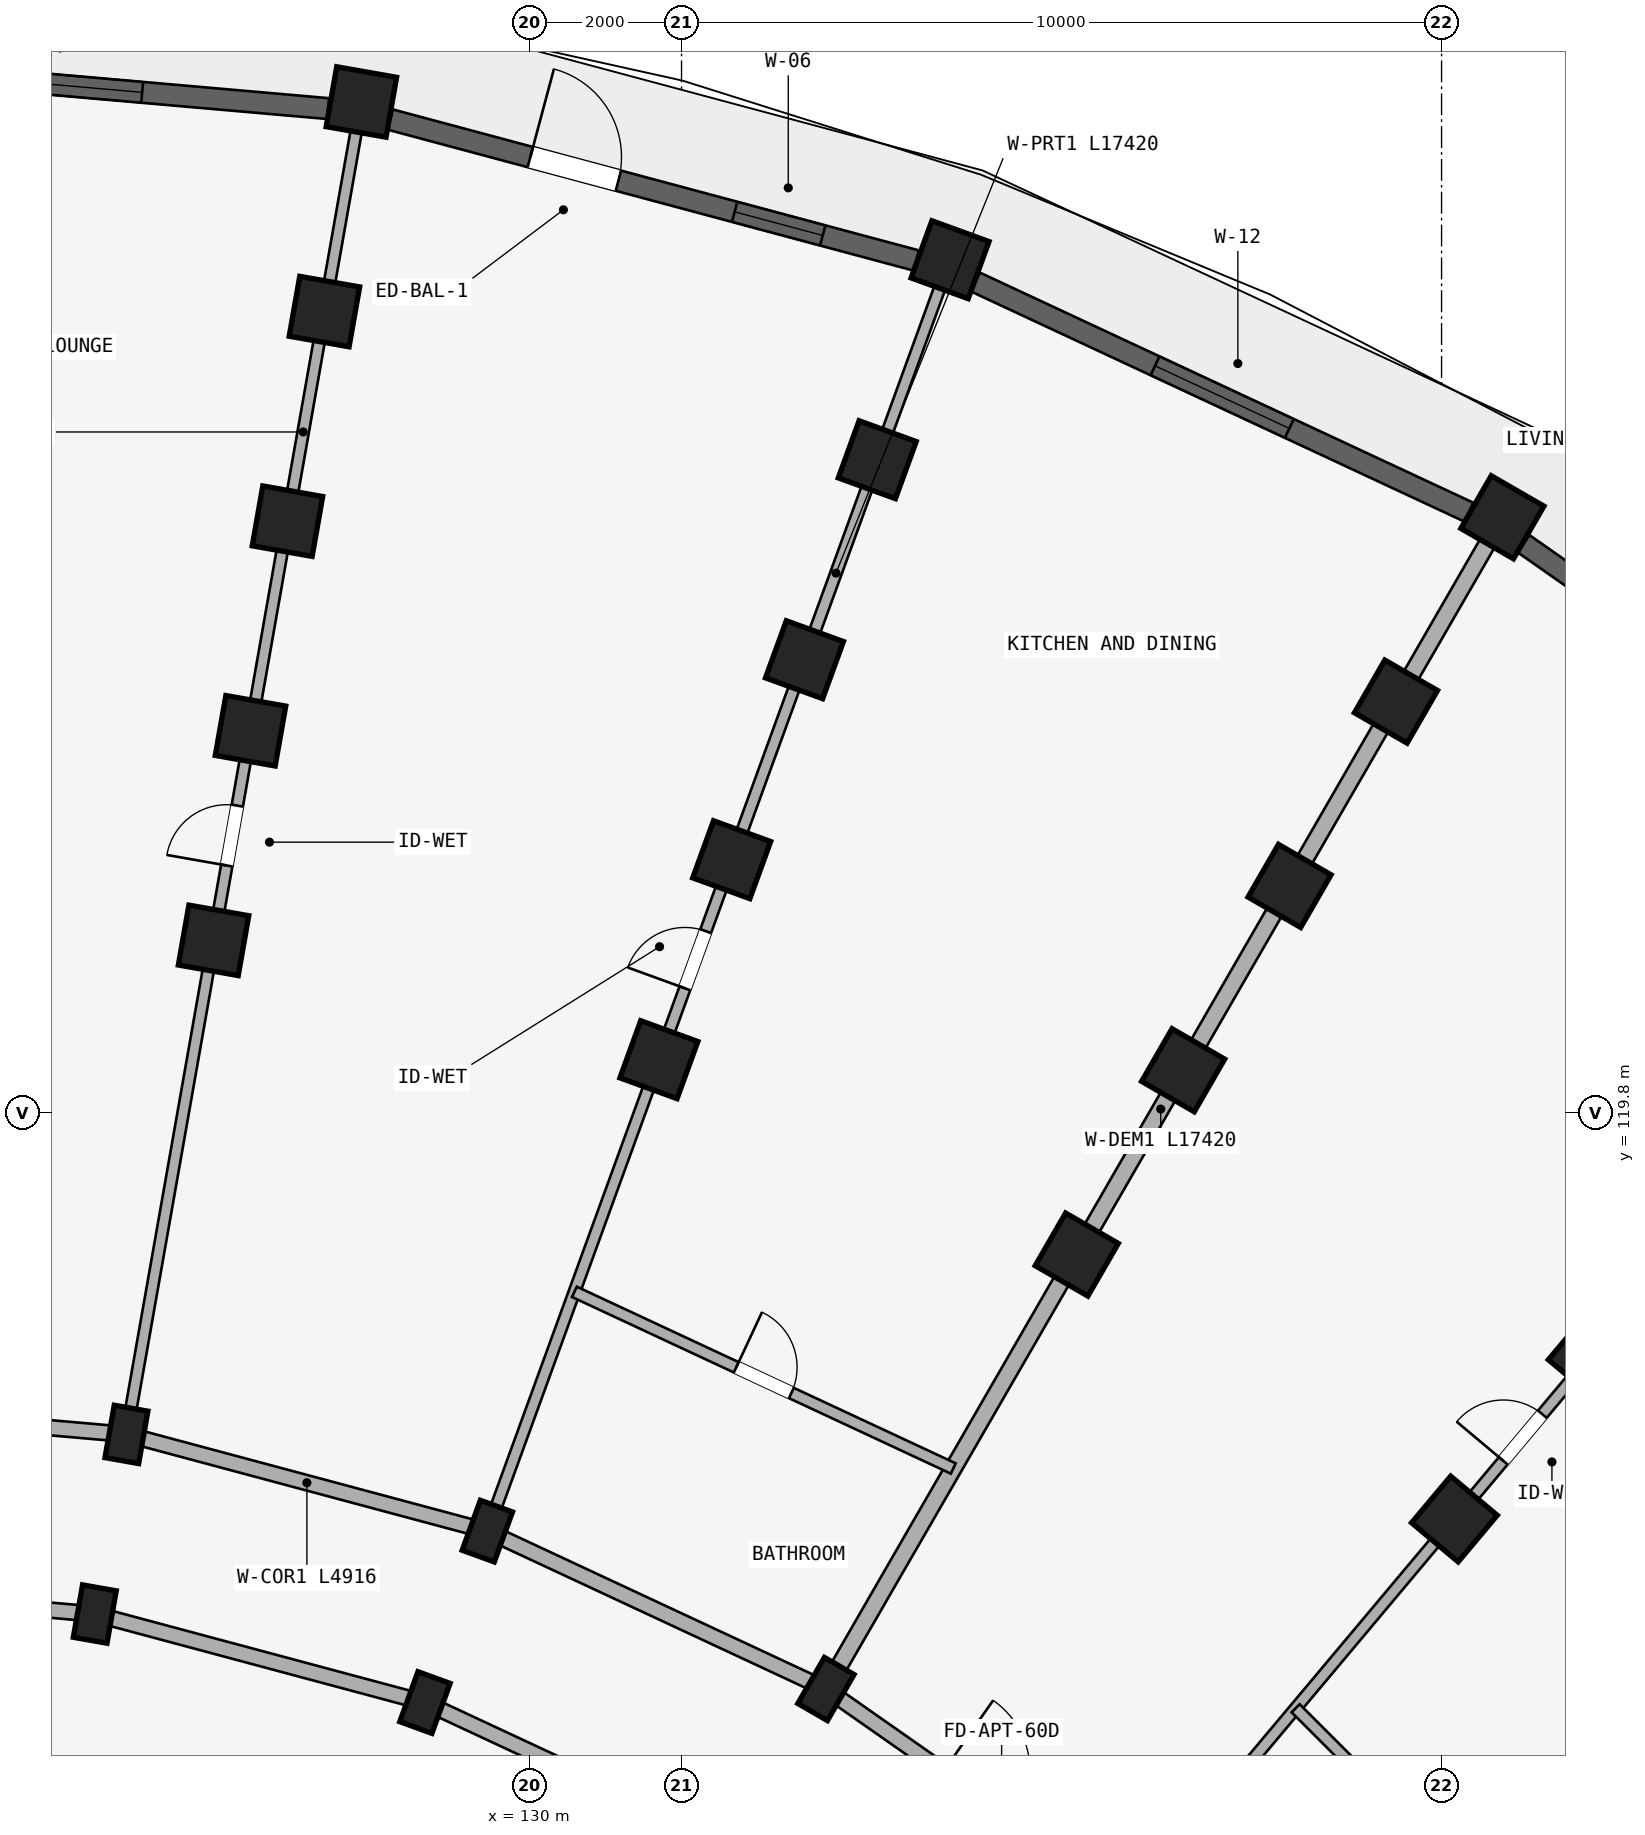
"""IFC4 building model, lengths in metres.
Left out: names, types, materials, properties, quantities, classifications, styles, units other than length and angle.
Written with IfcOpenShell. Run it as: python <this file> out.ifc"""

import sys

from ifc_helpers import new_model, si_unit, direction, frame, frame_2d, origin, origin_2d, place, context, subcontext, project, spatial, rectangle, extrude, element, fill, save


model = new_model("IFC4")
c1 = context("Model", 3, precision=1e-05, world=origin(), true_north=direction((0.0, 1.0)))
c2 = subcontext(c1, "Body", "Model", "MODEL_VIEW")
j1 = project(units=[si_unit("LENGTHUNIT", "METRE"), si_unit("PLANEANGLEUNIT", "RADIAN")], contexts=[c1])
p1 = place(None, origin())
s1 = spatial("IfcSite", under=j1, at=p1, CompositionType="ELEMENT")
p2 = place(p1, origin())
s2 = spatial("IfcBuilding", under=s1, at=p2, CompositionType="ELEMENT")
p3 = place(p2, frame((0.0, 0.0, 15.0)))
s3 = spatial("IfcBuildingStorey", under=s2, at=p3, CompositionType="ELEMENT", Elevation=15.0)
for number, where, z_axis, x_axis in (
    (1, (124.28, 113.208, 0.0), (0.0, 0.0, 1.0), (-0.985, 0.174, 0.0)),
    (2, (124.697, 115.572, 0.0), (0.0, 0.0, 1.0), (-0.985, 0.174, 0.0)),
):
    element("IfcColumn", number, at=place(p3, frame(where, z_axis=z_axis, x_axis=x_axis)), inside=s3, PredefinedType="COLUMN", context=c2, shape_type="SweptSolid", body=[
        extrude(rectangle(XDim=0.45, YDim=0.7, at=origin_2d()), origin(), (0.0, 0.0, 1.0), 2.93),
    ])
for number, where, z_axis, x_axis in (
    (3, (125.843, 122.071, 0.0), (0.0, 0.0, 1.0), (-0.985, 0.174, 0.0)),
    (4, (126.329, 124.829, 0.0), (0.0, 0.0, 1.0), (-0.985, 0.174, 0.0)),
    (5, (126.815, 127.586, 0.0), (0.0, 0.0, 1.0), (-0.985, 0.174, 0.0)),
    (6, (127.302, 130.344, 0.0), (0.0, 0.0, 1.0), (-0.985, 0.174, 0.0)),
    (7, (127.788, 133.101, 0.0), (0.0, 0.0, 1.0), (-0.985, 0.174, 0.0)),
):
    element("IfcColumn", number, at=place(p3, frame(where, z_axis=z_axis, x_axis=x_axis)), inside=s3, PredefinedType="COLUMN", context=c2, shape_type="SweptSolid", body=[
        extrude(rectangle(XDim=0.8, YDim=0.8, at=origin_2d()), origin(), (0.0, 0.0, 1.0), 2.93),
    ])
for number, where, z_axis, x_axis in (
    (8, (128.624, 112.044, 0.0), (0.0, 0.0, 1.0), (-0.94, 0.342, 0.0)),
    (9, (129.445, 114.299, 0.0), (0.0, 0.0, 1.0), (-0.94, 0.342, 0.0)),
):
    element("IfcColumn", number, at=place(p3, frame(where, z_axis=z_axis, x_axis=x_axis)), inside=s3, PredefinedType="COLUMN", context=c2, shape_type="SweptSolid", body=[
        extrude(rectangle(XDim=0.45, YDim=0.7, at=origin_2d()), origin(), (0.0, 0.0, 1.0), 2.93),
    ])
for number, where, z_axis, x_axis in (
    (10, (131.702, 120.501, 0.0), (0.0, 0.0, 1.0), (-0.94, 0.342, 0.0)),
    (11, (132.66, 123.132, 0.0), (0.0, 0.0, 1.0), (-0.94, 0.342, 0.0)),
    (12, (133.618, 125.764, 0.0), (0.0, 0.0, 1.0), (-0.94, 0.342, 0.0)),
    (13, (134.575, 128.395, 0.0), (0.0, 0.0, 1.0), (-0.94, 0.342, 0.0)),
    (14, (135.533, 131.026, 0.0), (0.0, 0.0, 1.0), (-0.94, 0.342, 0.0)),
):
    element("IfcColumn", number, at=place(p3, frame(where, z_axis=z_axis, x_axis=x_axis)), inside=s3, PredefinedType="COLUMN", context=c2, shape_type="SweptSolid", body=[
        extrude(rectangle(XDim=0.8, YDim=0.8, at=origin_2d()), origin(), (0.0, 0.0, 1.0), 2.93),
    ])
p4 = place(p3, frame((133.9, 112.222, 0.0), z_axis=(0.0, 0.0, 1.0), x_axis=(-0.866025403784, 0.5, 0.0)))
e15 = element("IfcColumn", 15, at=p4, inside=s3, PredefinedType="COLUMN", context=c2, shape_type="SweptSolid", body=[
    extrude(rectangle(XDim=0.45, YDim=0.7, at=origin_2d()), origin(), (0.0, 0.0, 1.0), 2.93),
])
for number, where, z_axis, x_axis in (
    (16, (137.2, 117.938, 0.0), (0.0, 0.0, 1.0), (-0.866, 0.5, 0.0)),
    (17, (138.6, 120.363, 0.0), (0.0, 0.0, 1.0), (-0.866, 0.5, 0.0)),
    (18, (140.0, 122.787, 0.0), (0.0, 0.0, 1.0), (-0.866, 0.5, 0.0)),
    (19, (141.4, 125.212, 0.0), (0.0, 0.0, 1.0), (-0.866, 0.5, 0.0)),
    (20, (142.8, 127.637, 0.0), (0.0, 0.0, 1.0), (-0.866, 0.5, 0.0)),
    (21, (142.169, 114.458, 0.0), (0.0, 0.0, 1.0), (-0.766, 0.643, 0.0)),
    (22, (143.969, 116.603, 0.0), (0.0, 0.0, 1.0), (-0.766, 0.643, 0.0)),
):
    element("IfcColumn", number, at=place(p3, frame(where, z_axis=z_axis, x_axis=x_axis)), inside=s3, PredefinedType="COLUMN", context=c2, shape_type="SweptSolid", body=[
        extrude(rectangle(XDim=0.8, YDim=0.8, at=origin_2d()), origin(), (0.0, 0.0, 1.0), 2.93),
    ])
p5 = place(p3, frame((119.8, 113.6, 0.0), z_axis=(0.0, 0.0, 1.0), x_axis=(0.996191949488, -0.087187153726, 0.0)))
e23 = element("IfcWall", 23, at=p5, inside=s3, PredefinedType="STANDARD", context=c2, shape_type="SweptSolid", body=[
    extrude(rectangle(XDim=4.497, YDim=0.2, at=frame_2d((2.249, 0.0))), origin(), (0.0, 0.0, 1.0), 2.372),
])
p6 = place(p5, frame((1.729, 0.0, 0.0)))
e24 = element("IfcOpeningElement", 24, at=p6, cuts=e23, PredefinedType="OPENING", context=c2, shape_type="SweptSolid", body=[
    extrude(rectangle(XDim=1.04, YDim=2.15, at=frame_2d((0.52, 1.075))), frame((0.0, 0.11, 0.0), z_axis=(0.0, -1.0, 0.0), x_axis=(1.0, 0.0, 0.0)), (0.0, 0.0, 1.0), 0.22),
])
p7 = place(p3, frame((119.8, 116.0, 0.0), z_axis=(0.0, 0.0, 1.0), x_axis=(0.996193663584, -0.087167566415, 0.0)))
e25 = element("IfcWall", 25, at=p7, inside=s3, PredefinedType="STANDARD", context=c2, shape_type="SweptSolid", body=[
    extrude(rectangle(XDim=4.916, YDim=0.2, at=frame_2d((2.458, 0.0))), origin(), (0.0, 0.0, 1.0), 2.372),
])
p8 = place(p7, frame((1.918, 0.0, 0.0)))
e26 = element("IfcOpeningElement", 26, at=p8, cuts=e25, PredefinedType="OPENING", context=c2, shape_type="SweptSolid", body=[
    extrude(rectangle(XDim=1.08, YDim=2.15, at=frame_2d((0.54, 1.075))), frame((0.0, 0.11, 0.0), z_axis=(0.0, -1.0, 0.0), x_axis=(1.0, 0.0, 0.0)), (0.0, 0.0, 1.0), 0.22),
])
p9 = place(p3, frame((124.28, 113.208, 0.0), z_axis=(0.0, 0.0, 1.0), x_axis=(0.965934240054, -0.258787642463, 0.0)))
e27 = element("IfcWall", 27, at=p9, inside=s3, PredefinedType="STANDARD", context=c2, shape_type="SweptSolid", body=[
    extrude(rectangle(XDim=4.497, YDim=0.2, at=frame_2d((2.249, 0.0))), origin(), (0.0, 0.0, 1.0), 2.372),
])
p10 = place(p3, frame((124.697, 115.572, 0.0), z_axis=(0.0, 0.0, 1.0), x_axis=(0.965930095386, -0.258803112091, 0.0)))
e28 = element("IfcWall", 28, at=p10, inside=s3, PredefinedType="STANDARD", context=c2, shape_type="SweptSolid", body=[
    extrude(rectangle(XDim=4.916, YDim=0.2, at=frame_2d((2.458, 0.0))), origin(), (0.0, 0.0, 1.0), 2.372),
])
p11 = place(p3, frame((128.624, 112.044, 0.0), z_axis=(0.0, 0.0, 1.0), x_axis=(0.906307919131, -0.422617978463, 0.0)))
e29 = element("IfcWall", 29, at=p11, inside=s3, PredefinedType="STANDARD", context=c2, shape_type="SweptSolid", body=[
    extrude(rectangle(XDim=4.497, YDim=0.2, at=frame_2d((2.249, 0.0))), origin(), (0.0, 0.0, 1.0), 2.372),
])
p12 = place(p3, frame((129.445, 114.299, 0.0), z_axis=(0.0, 0.0, 1.0), x_axis=(0.906302381024, -0.422629854778, 0.0)))
e30 = element("IfcWall", 30, at=p12, inside=s3, PredefinedType="STANDARD", context=c2, shape_type="SweptSolid", body=[
    extrude(rectangle(XDim=4.915, YDim=0.2, at=frame_2d((2.458, 0.0))), origin(), (0.0, 0.0, 1.0), 2.372),
])
p13 = place(p3, frame((133.9, 112.222, 0.0), z_axis=(0.0, 0.0, 1.0), x_axis=(0.819140911474, -0.573592335331, 0.0)))
e31 = element("IfcWall", 31, at=p13, inside=s3, PredefinedType="STANDARD", context=c2, shape_type="SweptSolid", body=[
    extrude(rectangle(XDim=4.916, YDim=0.2, at=frame_2d((2.458, 0.0))), origin(), (0.0, 0.0, 1.0), 2.372),
])
p14 = place(p13, frame((1.888, 0.0, 0.0)))
e32 = element("IfcOpeningElement", 32, at=p14, cuts=e31, PredefinedType="OPENING", context=c2, shape_type="SweptSolid", body=[
    extrude(rectangle(XDim=1.14, YDim=2.15, at=frame_2d((0.57, 1.075))), frame((0.0, 0.11, 0.0), z_axis=(0.0, -1.0, 0.0), x_axis=(1.0, 0.0, 0.0)), (0.0, 0.0, 1.0), 0.22),
])
p15 = place(p3, frame((124.714, 115.67, 0.0), z_axis=(0.0, 0.0, 1.0), x_axis=(0.173646216546, 0.984808098809, 0.0)))
e33 = element("IfcWall", 33, at=p15, inside=s3, PredefinedType="PARTITIONING", context=c2, shape_type="SweptSolid", body=[
    extrude(rectangle(XDim=17.42, YDim=0.15, at=frame_2d((8.71, 0.0))), origin(), (0.0, 0.0, 1.0), 2.372),
])
p16 = place(p15, frame((7.5, 0.0, 0.0)))
e34 = element("IfcOpeningElement", 34, at=p16, cuts=e33, PredefinedType="OPENING", context=c2, shape_type="SweptSolid", body=[
    extrude(rectangle(XDim=0.8, YDim=2.1, at=frame_2d((0.4, 1.05))), frame((0.0, 0.085, 0.0), z_axis=(0.0, -1.0, 0.0), x_axis=(1.0, 0.0, 0.0)), (0.0, 0.0, 1.0), 0.17),
])
p17 = place(p3, frame((129.479, 114.393, 0.0), z_axis=(0.0, 0.0, 1.0), x_axis=(0.342022120477, 0.939691901159, 0.0)))
e35 = element("IfcWall", 35, at=p17, inside=s3, PredefinedType="PARTITIONING", context=c2, shape_type="SweptSolid", body=[
    extrude(rectangle(XDim=17.42, YDim=0.15, at=frame_2d((8.71, 0.0))), origin(), (0.0, 0.0, 1.0), 2.372),
])
p18 = place(p17, frame((7.5, 0.0, 0.0)))
e36 = element("IfcOpeningElement", 36, at=p18, cuts=e35, PredefinedType="OPENING", context=c2, shape_type="SweptSolid", body=[
    extrude(rectangle(XDim=0.8, YDim=2.1, at=frame_2d((0.4, 1.05))), frame((0.0, 0.085, 0.0), z_axis=(0.0, -1.0, 0.0), x_axis=(1.0, 0.0, 0.0)), (0.0, 0.0, 1.0), 0.17),
])
p19 = place(p3, frame((133.95, 112.309, 0.0), z_axis=(0.0, 0.0, 1.0), x_axis=(0.499997843263, 0.866026648973, 0.0)))
e37 = element("IfcWall", 37, at=p19, inside=s3, PredefinedType="STANDARD", context=c2, shape_type="SweptSolid", body=[
    extrude(rectangle(XDim=17.42, YDim=0.22, at=frame_2d((8.71, 0.0))), origin(), (0.0, 0.0, 1.0), 2.372),
])
p20 = place(p3, frame((137.991, 109.479, 0.0), z_axis=(0.0, 0.0, 1.0), x_axis=(0.642784757967, 0.766046835987, 0.0)))
e38 = element("IfcWall", 38, at=p20, inside=s3, PredefinedType="PARTITIONING", context=c2, shape_type="SweptSolid", body=[
    extrude(rectangle(XDim=17.42, YDim=0.15, at=frame_2d((8.71, 0.0))), origin(), (0.0, 0.0, 1.0), 2.372),
])
p21 = place(p20, frame((7.5, 0.0, 0.0)))
e39 = element("IfcOpeningElement", 39, at=p21, cuts=e38, PredefinedType="OPENING", context=c2, shape_type="SweptSolid", body=[
    extrude(rectangle(XDim=0.8, YDim=2.1, at=frame_2d((0.4, 1.05))), frame((0.0, 0.085, 0.0), z_axis=(0.0, -1.0, 0.0), x_axis=(1.0, 0.0, 0.0)), (0.0, 0.0, 1.0), 0.17),
])
p22 = place(p3, frame((141.479, 105.991, 0.0), z_axis=(0.0, 0.0, 1.0), x_axis=(0.766046835987, 0.642784757967, 0.0)))
e40 = element("IfcWall", 40, at=p22, inside=s3, PredefinedType="STANDARD", context=c2, shape_type="SweptSolid", body=[
    extrude(rectangle(XDim=17.42, YDim=0.22, at=frame_2d((8.71, 0.0))), origin(), (0.0, 0.0, 1.0), 2.372),
])
p23 = place(p3, frame((130.591, 117.447, 0.0), z_axis=(0.0, 0.0, 1.0), x_axis=(0.906302189986, -0.422630264446, 0.0)))
e41 = element("IfcWall", 41, at=p23, inside=s3, PredefinedType="PLUMBINGWALL", context=c2, shape_type="SweptSolid", body=[
    extrude(rectangle(XDim=5.5, YDim=0.15, at=frame_2d((2.75, 0.0))), origin(), (0.0, 0.0, 1.0), 2.372),
])
p24 = place(p23, frame((2.35, 0.0, 0.0)))
e42 = element("IfcOpeningElement", 42, at=p24, cuts=e41, PredefinedType="OPENING", context=c2, shape_type="SweptSolid", body=[
    extrude(rectangle(XDim=0.8, YDim=2.1, at=frame_2d((0.4, 1.05))), frame((0.0, 0.085, 0.0), z_axis=(0.0, -1.0, 0.0), x_axis=(1.0, 0.0, 0.0)), (0.0, 0.0, 1.0), 0.17),
])
p25 = place(p3, frame((140.08, 111.969, 0.0), z_axis=(0.0, 0.0, 1.0), x_axis=(0.707106781187, -0.707106781187, 0.0)))
e43 = element("IfcWall", 43, at=p25, inside=s3, PredefinedType="PLUMBINGWALL", context=c2, shape_type="SweptSolid", body=[
    extrude(rectangle(XDim=5.5, YDim=0.15, at=frame_2d((2.75, 0.0))), origin(), (0.0, 0.0, 1.0), 2.372),
])
p26 = place(p25, frame((2.37, 0.0, 0.0)))
e44 = element("IfcOpeningElement", 44, at=p26, cuts=e43, PredefinedType="OPENING", context=c2, shape_type="SweptSolid", body=[
    extrude(rectangle(XDim=0.76, YDim=2.05, at=frame_2d((0.38, 1.025))), frame((0.0, 0.085, 0.0), z_axis=(0.0, -1.0, 0.0), x_axis=(1.0, 0.0, 0.0)), (0.0, 0.0, 1.0), 0.17),
])
p27 = place(p3, frame((120.215, 133.638, 0.0), z_axis=(0.0, 0.0, 1.0), x_axis=(0.99619608453, -0.08713989423, 0.0)))
e45 = element("IfcWall", 45, at=p27, inside=s3, PredefinedType="STANDARD", context=c2, shape_type="SweptSolid", body=[
    extrude(rectangle(XDim=7.164, YDim=0.275, at=frame_2d((3.582, 0.0))), origin(), (0.0, 0.0, 1.0), 2.472),
])
p28 = place(p27, frame((2.457, 0.0, 0.322)))
e46 = element("IfcOpeningElement", 46, at=p28, cuts=e45, PredefinedType="OPENING", context=c2, shape_type="SweptSolid", body=[
    extrude(rectangle(XDim=2.25, YDim=1.95, at=frame_2d((1.125, 0.975))), frame((0.0, 0.147, 0.0), z_axis=(0.0, -1.0, 0.0), x_axis=(1.0, 0.0, 0.0)), (0.0, 0.0, 1.0), 0.295),
])
p29 = place(p3, frame((128.168, 132.87, 0.0), z_axis=(0.0, 0.0, 1.0), x_axis=(0.965923712619, -0.258826933296, 0.0)))
e47 = element("IfcWall", 47, at=p29, inside=s3, PredefinedType="STANDARD", context=c2, shape_type="SweptSolid", body=[
    extrude(rectangle(XDim=7.164, YDim=0.275, at=frame_2d((3.582, 0.0))), origin(), (0.0, 0.0, 1.0), 2.472),
])
p30 = place(p29, frame((4.69, 0.0, 0.472)))
e48 = element("IfcOpeningElement", 48, at=p30, cuts=e47, PredefinedType="OPENING", context=c2, shape_type="SweptSolid", body=[
    extrude(rectangle(XDim=1.2, YDim=1.5, at=frame_2d((0.6, 0.75))), frame((0.0, 0.147, 0.0), z_axis=(0.0, -1.0, 0.0), x_axis=(1.0, 0.0, 0.0)), (0.0, 0.0, 1.0), 0.295),
])
p31 = place(p29, frame((1.907, 0.0, 0.0)))
e49 = element("IfcOpeningElement", 49, at=p31, cuts=e47, PredefinedType="OPENING", context=c2, shape_type="SweptSolid", body=[
    extrude(rectangle(XDim=1.2, YDim=2.15, at=frame_2d((0.6, 1.075))), frame((0.0, 0.147, 0.0), z_axis=(0.0, -1.0, 0.0), x_axis=(1.0, 0.0, 0.0)), (0.0, 0.0, 1.0), 0.295),
])
p32 = place(p3, frame((135.867, 130.732, 0.0), z_axis=(0.0, 0.0, 1.0), x_axis=(0.906300636296, -0.422633596215, 0.0)))
e50 = element("IfcWall", 50, at=p32, inside=s3, PredefinedType="STANDARD", context=c2, shape_type="SweptSolid", body=[
    extrude(rectangle(XDim=7.164, YDim=0.275, at=frame_2d((3.582, 0.0))), origin(), (0.0, 0.0, 1.0), 2.472),
])
p33 = place(p32, frame((2.607, 0.0, 0.422)))
e51 = element("IfcOpeningElement", 51, at=p33, cuts=e50, PredefinedType="OPENING", context=c2, shape_type="SweptSolid", body=[
    extrude(rectangle(XDim=1.95, YDim=1.85, at=frame_2d((0.975, 0.925))), frame((0.0, 0.147, 0.0), z_axis=(0.0, -1.0, 0.0), x_axis=(1.0, 0.0, 0.0)), (0.0, 0.0, 1.0), 0.295),
])
p34 = place(p3, frame((143.078, 127.29, 0.0), z_axis=(0.0, 0.0, 1.0), x_axis=(0.819161471697, -0.573562972382, 0.0)))
e52 = element("IfcWall", 52, at=p34, inside=s3, PredefinedType="STANDARD", context=c2, shape_type="SweptSolid", body=[
    extrude(rectangle(XDim=7.164, YDim=0.275, at=frame_2d((3.582, 0.0))), origin(), (0.0, 0.0, 1.0), 2.472),
])
p35 = place(p34, frame((2.682, 0.0, 0.622)))
e53 = element("IfcOpeningElement", 53, at=p35, cuts=e52, PredefinedType="OPENING", context=c2, shape_type="SweptSolid", body=[
    extrude(rectangle(XDim=1.8, YDim=1.65, at=frame_2d((0.9, 0.825))), frame((0.0, 0.147, 0.0), z_axis=(0.0, -1.0, 0.0), x_axis=(1.0, 0.0, 0.0)), (0.0, 0.0, 1.0), 0.295),
])
p36 = place(p28, origin())
e54 = element("IfcWindow", 54, at=p36, inside=s3, PartitioningType="TRIPLE_PANEL_VERTICAL", PredefinedType="WINDOW", context=c2, shape_type="SweptSolid", body=[
    extrude(rectangle(XDim=2.25, YDim=1.95, at=frame_2d((1.125, 0.975))), frame((0.0, 0.03, 0.0), z_axis=(0.0, -1.0, 0.0), x_axis=(1.0, 0.0, 0.0)), (0.0, 0.0, 1.0), 0.06),
])
fill(e46, e54)
p37 = place(p30, origin())
e55 = element("IfcWindow", 55, at=p37, inside=s3, PartitioningType="SINGLE_PANEL", PredefinedType="WINDOW", context=c2, shape_type="SweptSolid", body=[
    extrude(rectangle(XDim=1.2, YDim=1.5, at=frame_2d((0.6, 0.75))), frame((0.0, 0.03, 0.0), z_axis=(0.0, -1.0, 0.0), x_axis=(1.0, 0.0, 0.0)), (0.0, 0.0, 1.0), 0.06),
])
fill(e48, e55)
p38 = place(p33, origin())
e56 = element("IfcWindow", 56, at=p38, inside=s3, PartitioningType="DOUBLE_PANEL_VERTICAL", PredefinedType="WINDOW", context=c2, shape_type="SweptSolid", body=[
    extrude(rectangle(XDim=1.95, YDim=1.85, at=frame_2d((0.975, 0.925))), frame((0.0, 0.03, 0.0), z_axis=(0.0, -1.0, 0.0), x_axis=(1.0, 0.0, 0.0)), (0.0, 0.0, 1.0), 0.06),
])
fill(e51, e56)
p39 = place(p16, origin())
e57 = element("IfcDoor", 57, at=p39, inside=s3, OperationType="SINGLE_SWING_LEFT", PredefinedType="DOOR", context=c2, shape_type="SweptSolid", body=[
    extrude(rectangle(XDim=0.8, YDim=2.1, at=frame_2d((0.4, 1.05))), frame((0.0, 0.025, 0.0), z_axis=(0.0, -1.0, 0.0), x_axis=(1.0, 0.0, 0.0)), (0.0, 0.0, 1.0), 0.05),
])
fill(e34, e57)
p40 = place(p18, frame((0.8, 0.0, 0.0), z_axis=(0.0, 0.0, 1.0), x_axis=(-1.0, 0.0, 0.0)))
e58 = element("IfcDoor", 58, at=p40, inside=s3, OperationType="SINGLE_SWING_RIGHT", PredefinedType="DOOR", context=c2, shape_type="SweptSolid", body=[
    extrude(rectangle(XDim=0.8, YDim=2.1, at=frame_2d((0.4, 1.05))), frame((0.0, 0.025, 0.0), z_axis=(0.0, -1.0, 0.0), x_axis=(1.0, 0.0, 0.0)), (0.0, 0.0, 1.0), 0.05),
])
fill(e36, e58)
p41 = place(p21, origin())
e59 = element("IfcDoor", 59, at=p41, inside=s3, OperationType="SINGLE_SWING_LEFT", PredefinedType="DOOR", context=c2, shape_type="SweptSolid", body=[
    extrude(rectangle(XDim=0.8, YDim=2.1, at=frame_2d((0.4, 1.05))), frame((0.0, 0.025, 0.0), z_axis=(0.0, -1.0, 0.0), x_axis=(1.0, 0.0, 0.0)), (0.0, 0.0, 1.0), 0.05),
])
fill(e39, e59)
p42 = place(p24, origin())
e60 = element("IfcDoor", 60, at=p42, inside=s3, OperationType="SINGLE_SWING_LEFT", PredefinedType="DOOR", context=c2, shape_type="SweptSolid", body=[
    extrude(rectangle(XDim=0.8, YDim=2.1, at=frame_2d((0.4, 1.05))), frame((0.0, 0.025, 0.0), z_axis=(0.0, -1.0, 0.0), x_axis=(1.0, 0.0, 0.0)), (0.0, 0.0, 1.0), 0.05),
])
fill(e42, e60)
p43 = place(p31, origin())
e61 = element("IfcDoor", 61, at=p43, inside=s3, OperationType="SINGLE_SWING_LEFT", PredefinedType="DOOR", context=c2, shape_type="SweptSolid", body=[
    extrude(rectangle(XDim=1.2, YDim=2.15, at=frame_2d((0.6, 1.075))), frame((0.0, 0.025, 0.0), z_axis=(0.0, -1.0, 0.0), x_axis=(1.0, 0.0, 0.0)), (0.0, 0.0, 1.0), 0.05),
])
fill(e49, e61)
save(model, sys.argv[1])
